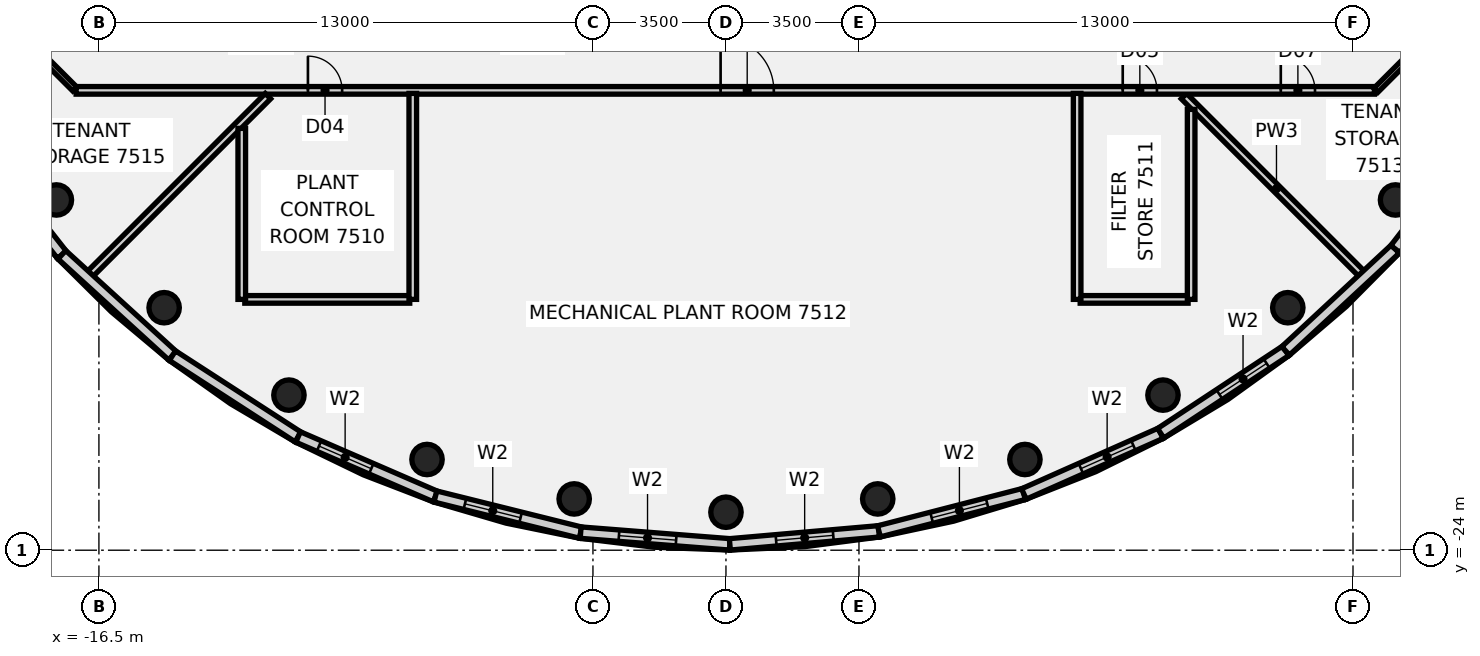
"""IFC4 building model, lengths in metres.
Left out: names, types, materials, properties, quantities, classifications, styles, units other than length and angle.
Written with IfcOpenShell. Run it as: python <this file> out.ifc"""

import sys

from ifc_helpers import new_model, si_unit, direction, frame, frame_2d, origin, origin_2d, place, context, subcontext, project, spatial, rectangle, circle, extrude, element, fill, save


model = new_model("IFC4")
c1 = context("Model", 3, precision=1e-05, world=origin(), true_north=direction((0.0, 1.0)))
c2 = subcontext(c1, "Body", "Model", "MODEL_VIEW")
j1 = project(units=[si_unit("LENGTHUNIT", "METRE"), si_unit("PLANEANGLEUNIT", "RADIAN")], contexts=[c1])
p1 = place(None, origin())
s1 = spatial("IfcSite", under=j1, at=p1, CompositionType="ELEMENT")
p2 = place(p1, origin())
s2 = spatial("IfcBuilding", under=s1, at=p2, CompositionType="ELEMENT")
p3 = place(p2, frame((0.0, 0.0, 305.4)))
s3 = spatial("IfcBuildingStorey", under=s2, at=p3, CompositionType="ELEMENT", Elevation=305.4)
for number, where, z_axis, x_axis in (
    (1, (-17.619, -14.784, -0.18), (0.0, 0.0, 1.0), (1.0, 0.0, 0.0)),
    (2, (-14.784, -17.619, -0.18), (0.0, 0.0, 1.0), (1.0, 0.0, 0.0)),
    (3, (-11.5, -19.919, -0.18), (0.0, 0.0, 1.0), (1.0, 0.0, 0.0)),
    (4, (-7.866, -21.613, -0.18), (0.0, 0.0, 1.0), (1.0, 0.0, 0.0)),
    (5, (-3.994, -22.651, -0.18), (0.0, 0.0, 1.0), (1.0, 0.0, 0.0)),
    (6, (0.0, -23.0, -0.18), (0.0, 0.0, 1.0), (1.0, 0.0, 0.0)),
    (7, (3.994, -22.651, -0.18), (0.0, 0.0, 1.0), (1.0, 0.0, 0.0)),
    (8, (7.866, -21.613, -0.18), (0.0, 0.0, 1.0), (1.0, 0.0, 0.0)),
    (9, (11.5, -19.919, -0.18), (0.0, 0.0, 1.0), (1.0, 0.0, 0.0)),
    (10, (14.784, -17.619, -0.18), (0.0, 0.0, 1.0), (1.0, 0.0, 0.0)),
    (11, (17.619, -14.784, -0.18), (0.0, 0.0, 1.0), (1.0, 0.0, 0.0)),
):
    element("IfcColumn", number, at=place(p3, frame(where, z_axis=z_axis, x_axis=x_axis)), inside=s3, PredefinedType="COLUMN", context=c2, shape_type="SweptSolid", body=[
        extrude(circle(Radius=0.4, at=origin_2d()), origin(), (0.0, 0.0, 1.0), 4.0),
    ])
p4 = place(p3, frame((-18.872, -10.128, 0.0), z_axis=(0.0, 0.0, 1.0), x_axis=(0.707106781187, -0.707106781187, 0.0)))
e12 = element("IfcWall", 12, at=p4, inside=s3, PredefinedType="PARTITIONING", context=c2, shape_type="SweptSolid", body=[
    extrude(rectangle(XDim=2.455, YDim=0.15, at=frame_2d((1.228, 0.0))), origin(), (0.0, 0.0, 1.0), 3.22),
])
p5 = place(p3, frame((12.052, -12.052, 0.0), z_axis=(0.0, 0.0, 1.0), x_axis=(0.707106781187, -0.707106781187, 0.0)))
e13 = element("IfcWall", 13, at=p5, inside=s3, PredefinedType="PARTITIONING", context=c2, shape_type="SweptSolid", body=[
    extrude(rectangle(XDim=6.886, YDim=0.2, at=frame_2d((3.443, 0.0))), origin(), (0.0, 0.0, 1.0), 3.22),
])
p6 = place(p3, frame((-17.1, -11.9, 0.0), z_axis=(0.0, 0.0, 1.0), x_axis=(1.0, 0.0, 0.0)))
e14 = element("IfcWall", 14, at=p6, inside=s3, PredefinedType="PARTITIONING", context=c2, shape_type="SweptSolid", body=[
    extrude(rectangle(XDim=34.165, YDim=0.2, at=frame_2d((17.083, 0.0))), origin(), (0.0, 0.0, 1.0), 3.22),
])
p7 = place(p6, frame((6.1, 0.0, 0.0)))
e15 = element("IfcOpeningElement", 15, at=p7, cuts=e14, PredefinedType="OPENING", context=c2, shape_type="SweptSolid", body=[
    extrude(rectangle(XDim=0.9, YDim=2.1, at=frame_2d((0.45, 1.05))), frame((0.0, 0.11, 0.0), z_axis=(0.0, -1.0, 0.0), x_axis=(1.0, 0.0, 0.0)), (0.0, 0.0, 1.0), 0.22),
])
p8 = place(p6, frame((27.541, 0.0, 0.0)))
e16 = element("IfcOpeningElement", 16, at=p8, cuts=e14, PredefinedType="OPENING", context=c2, shape_type="SweptSolid", body=[
    extrude(rectangle(XDim=0.9, YDim=2.1, at=frame_2d((0.45, 1.05))), frame((0.0, 0.11, 0.0), z_axis=(0.0, -1.0, 0.0), x_axis=(1.0, 0.0, 0.0)), (0.0, 0.0, 1.0), 0.22),
])
p9 = place(p6, frame((16.959, 0.0, 0.0)))
e17 = element("IfcOpeningElement", 17, at=p9, cuts=e14, PredefinedType="OPENING", context=c2, shape_type="SweptSolid", body=[
    extrude(rectangle(XDim=1.4, YDim=2.1, at=frame_2d((0.7, 1.05))), frame((0.0, 0.11, 0.0), z_axis=(0.0, -1.0, 0.0), x_axis=(1.0, 0.0, 0.0)), (0.0, 0.0, 1.0), 0.22),
])
p10 = place(p6, frame((31.7, 0.0, 0.0)))
e18 = element("IfcOpeningElement", 18, at=p10, cuts=e14, PredefinedType="OPENING", context=c2, shape_type="SweptSolid", body=[
    extrude(rectangle(XDim=0.9, YDim=2.1, at=frame_2d((0.45, 1.05))), frame((0.0, 0.11, 0.0), z_axis=(0.0, -1.0, 0.0), x_axis=(1.0, 0.0, 0.0)), (0.0, 0.0, 1.0), 0.22),
])
p11 = place(p3, frame((-12.661, -17.4, 0.0), z_axis=(0.0, 0.0, 1.0), x_axis=(1.0, 0.0, 0.0)))
e19 = element("IfcWall", 19, at=p11, inside=s3, PredefinedType="PARTITIONING", context=c2, shape_type="SweptSolid", body=[
    extrude(rectangle(XDim=4.34, YDim=0.2, at=frame_2d((2.17, 0.0))), origin(), (0.0, 0.0, 1.0), 3.22),
])
p12 = place(p3, frame((9.321, -17.4, 0.0), z_axis=(0.0, 0.0, 1.0), x_axis=(1.0, 0.0, 0.0)))
e20 = element("IfcWall", 20, at=p12, inside=s3, PredefinedType="PARTITIONING", context=c2, shape_type="SweptSolid", body=[
    extrude(rectangle(XDim=2.84, YDim=0.2, at=frame_2d((1.42, 0.0))), origin(), (0.0, 0.0, 1.0), 3.22),
])
p13 = place(p3, frame((-16.927, -16.927, 0.0), z_axis=(0.0, 0.0, 1.0), x_axis=(0.707106781187, 0.707106781187, 0.0)))
e21 = element("IfcWall", 21, at=p13, inside=s3, PredefinedType="PARTITIONING", context=c2, shape_type="SweptSolid", body=[
    extrude(rectangle(XDim=6.894, YDim=0.2, at=frame_2d((3.447, 0.0))), origin(), (0.0, 0.0, 1.0), 3.22),
])
p14 = place(p3, frame((17.1, -11.9, 0.0), z_axis=(0.0, 0.0, 1.0), x_axis=(0.707106781187, 0.707106781187, 0.0)))
e22 = element("IfcWall", 22, at=p14, inside=s3, PredefinedType="PARTITIONING", context=c2, shape_type="SweptSolid", body=[
    extrude(rectangle(XDim=2.505, YDim=0.15, at=frame_2d((1.253, 0.0))), origin(), (0.0, 0.0, 1.0), 3.22),
])
p15 = place(p3, frame((-12.741, -17.4, 0.0), z_axis=(0.0, 0.0, 1.0), x_axis=(0.0, 1.0, 0.0)))
e23 = element("IfcWall", 23, at=p15, inside=s3, PredefinedType="PARTITIONING", context=c2, shape_type="SweptSolid", body=[
    extrude(rectangle(XDim=4.499, YDim=0.2, at=frame_2d((2.25, 0.0))), origin(), (0.0, 0.0, 1.0), 3.22),
])
for number, where, z_axis, x_axis in (
    (24, (-8.241, -17.4, 0.0), (0.0, 0.0, 1.0), (0.0, 1.0, 0.0)),
    (25, (9.241, -17.4, 0.0), (0.0, 0.0, 1.0), (0.0, 1.0, 0.0)),
):
    element("IfcWall", number, at=place(p3, frame(where, z_axis=z_axis, x_axis=x_axis)), inside=s3, PredefinedType="PARTITIONING", context=c2, shape_type="SweptSolid", body=[
        extrude(rectangle(XDim=5.42, YDim=0.2, at=frame_2d((2.71, 0.0))), origin(), (0.0, 0.0, 1.0), 3.22),
    ])
p16 = place(p3, frame((12.241, -17.4, 0.0), z_axis=(0.0, 0.0, 1.0), x_axis=(0.0, 1.0, 0.0)))
e26 = element("IfcWall", 26, at=p16, inside=s3, PredefinedType="PARTITIONING", context=c2, shape_type="SweptSolid", body=[
    extrude(rectangle(XDim=4.999, YDim=0.2, at=frame_2d((2.5, 0.0))), origin(), (0.0, 0.0, 1.0), 3.22),
])
p17 = place(p3, frame((-19.906, -13.128, 0.0), z_axis=(0.0, 0.0, 1.0), x_axis=(0.617577851206, -0.786509756901, 0.0)))
e27 = element("IfcWall", 27, at=p17, inside=s3, PredefinedType="SOLIDWALL", context=c2, shape_type="SweptSolid", body=[
    extrude(rectangle(XDim=3.938, YDim=0.3, at=frame_2d((1.969, 0.0))), origin(), (0.0, 0.0, 1.0), 3.82),
])
p18 = place(p3, frame((-17.474, -16.226, 0.0), z_axis=(0.0, 0.0, 1.0), x_axis=(0.738634435884, -0.674106200926, 0.0)))
e28 = element("IfcWall", 28, at=p18, inside=s3, PredefinedType="SOLIDWALL", context=c2, shape_type="SweptSolid", body=[
    extrude(rectangle(XDim=3.938, YDim=0.3, at=frame_2d((1.969, 0.0))), origin(), (0.0, 0.0, 1.0), 3.82),
])
p19 = place(p3, frame((-14.565, -18.881, 0.0), z_axis=(0.0, 0.0, 1.0), x_axis=(0.839498632024, -0.54336180104, 0.0)))
e29 = element("IfcWall", 29, at=p19, inside=s3, PredefinedType="SOLIDWALL", context=c2, shape_type="SweptSolid", body=[
    extrude(rectangle(XDim=3.938, YDim=0.3, at=frame_2d((1.969, 0.0))), origin(), (0.0, 0.0, 1.0), 3.82),
])
p20 = place(p3, frame((-11.259, -21.021, 0.0), z_axis=(0.0, 0.0, 1.0), x_axis=(0.917505110173, -0.397723990735, 0.0)))
e30 = element("IfcWall", 30, at=p20, inside=s3, PredefinedType="SOLIDWALL", context=c2, shape_type="SweptSolid", body=[
    extrude(rectangle(XDim=3.938, YDim=0.3, at=frame_2d((1.969, 0.0))), origin(), (0.0, 0.0, 1.0), 3.82),
])
p21 = place(p20, frame((0.6, 0.0, 1.4)))
e31 = element("IfcOpeningElement", 31, at=p21, cuts=e30, PredefinedType="OPENING", context=c2, shape_type="SweptSolid", body=[
    extrude(rectangle(XDim=1.498, YDim=2.12, at=frame_2d((0.749, 1.06))), frame((0.0, 0.16, 0.0), z_axis=(0.0, -1.0, 0.0), x_axis=(1.0, 0.0, 0.0)), (0.0, 0.0, 1.0), 0.32),
])
p22 = place(p3, frame((-7.646, -22.587, 0.0), z_axis=(0.0, 0.0, 1.0), x_axis=(0.970440788586, -0.241339337547, 0.0)))
e32 = element("IfcWall", 32, at=p22, inside=s3, PredefinedType="SOLIDWALL", context=c2, shape_type="SweptSolid", body=[
    extrude(rectangle(XDim=3.938, YDim=0.3, at=frame_2d((1.969, 0.0))), origin(), (0.0, 0.0, 1.0), 3.82),
])
p23 = place(p22, frame((0.801, 0.0, 1.4)))
e33 = element("IfcOpeningElement", 33, at=p23, cuts=e32, PredefinedType="OPENING", context=c2, shape_type="SweptSolid", body=[
    extrude(rectangle(XDim=1.509, YDim=2.12, at=frame_2d((0.754, 1.06))), frame((0.0, 0.16, 0.0), z_axis=(0.0, -1.0, 0.0), x_axis=(1.0, 0.0, 0.0)), (0.0, 0.0, 1.0), 0.32),
])
p24 = place(p3, frame((-3.824, -23.537, 0.0), z_axis=(0.0, 0.0, 1.0), x_axis=(0.996930318741, -0.078293930641, 0.0)))
e34 = element("IfcWall", 34, at=p24, inside=s3, PredefinedType="SOLIDWALL", context=c2, shape_type="SweptSolid", body=[
    extrude(rectangle(XDim=3.938, YDim=0.3, at=frame_2d((1.969, 0.0))), origin(), (0.0, 0.0, 1.0), 3.82),
])
p25 = place(p24, frame((1.011, 0.0, 1.4)))
e35 = element("IfcOpeningElement", 35, at=p25, cuts=e34, PredefinedType="OPENING", context=c2, shape_type="SweptSolid", body=[
    extrude(rectangle(XDim=1.509, YDim=2.12, at=frame_2d((0.754, 1.06))), frame((0.0, 0.16, 0.0), z_axis=(0.0, -1.0, 0.0), x_axis=(1.0, 0.0, 0.0)), (0.0, 0.0, 1.0), 0.32),
])
p26 = place(p3, frame((0.103, -23.846, 0.0), z_axis=(0.0, 0.0, 1.0), x_axis=(0.99621635874, 0.08690780505, 0.0)))
e36 = element("IfcWall", 36, at=p26, inside=s3, PredefinedType="SOLIDWALL", context=c2, shape_type="SweptSolid", body=[
    extrude(rectangle(XDim=3.938, YDim=0.3, at=frame_2d((1.969, 0.0))), origin(), (0.0, 0.0, 1.0), 3.82),
])
p27 = place(p26, frame((1.221, 0.0, 1.4)))
e37 = element("IfcOpeningElement", 37, at=p27, cuts=e36, PredefinedType="OPENING", context=c2, shape_type="SweptSolid", body=[
    extrude(rectangle(XDim=1.509, YDim=2.12, at=frame_2d((0.755, 1.06))), frame((0.0, 0.16, 0.0), z_axis=(0.0, -1.0, 0.0), x_axis=(1.0, 0.0, 0.0)), (0.0, 0.0, 1.0), 0.32),
])
p28 = place(p3, frame((4.026, -23.503, 0.0), z_axis=(0.0, 0.0, 1.0), x_axis=(0.968336809904, 0.24964739651, 0.0)))
e38 = element("IfcWall", 38, at=p28, inside=s3, PredefinedType="SOLIDWALL", context=c2, shape_type="SweptSolid", body=[
    extrude(rectangle(XDim=3.938, YDim=0.3, at=frame_2d((1.969, 0.0))), origin(), (0.0, 0.0, 1.0), 3.82),
])
p29 = place(p28, frame((1.432, 0.0, 1.4)))
e39 = element("IfcOpeningElement", 39, at=p29, cuts=e38, PredefinedType="OPENING", context=c2, shape_type="SweptSolid", body=[
    extrude(rectangle(XDim=1.509, YDim=2.12, at=frame_2d((0.754, 1.06))), frame((0.0, 0.16, 0.0), z_axis=(0.0, -1.0, 0.0), x_axis=(1.0, 0.0, 0.0)), (0.0, 0.0, 1.0), 0.32),
])
p30 = place(p3, frame((7.84, -22.52, 0.0), z_axis=(0.0, 0.0, 1.0), x_axis=(0.91404912862, 0.405603489221, 0.0)))
e40 = element("IfcWall", 40, at=p30, inside=s3, PredefinedType="SOLIDWALL", context=c2, shape_type="SweptSolid", body=[
    extrude(rectangle(XDim=3.938, YDim=0.3, at=frame_2d((1.969, 0.0))), origin(), (0.0, 0.0, 1.0), 3.82),
])
p31 = place(p30, frame((1.643, 0.0, 1.4)))
e41 = element("IfcOpeningElement", 41, at=p31, cuts=e40, PredefinedType="OPENING", context=c2, shape_type="SweptSolid", body=[
    extrude(rectangle(XDim=1.509, YDim=2.12, at=frame_2d((0.754, 1.06))), frame((0.0, 0.16, 0.0), z_axis=(0.0, -1.0, 0.0), x_axis=(1.0, 0.0, 0.0)), (0.0, 0.0, 1.0), 0.32),
])
p32 = place(p3, frame((11.439, -20.923, 0.0), z_axis=(0.0, 0.0, 1.0), x_axis=(0.834786621205, 0.550573607302, 0.0)))
e42 = element("IfcWall", 42, at=p32, inside=s3, PredefinedType="SOLIDWALL", context=c2, shape_type="SweptSolid", body=[
    extrude(rectangle(XDim=3.938, YDim=0.3, at=frame_2d((1.969, 0.0))), origin(), (0.0, 0.0, 1.0), 3.82),
])
p33 = place(p32, frame((1.853, 0.0, 1.4)))
e43 = element("IfcOpeningElement", 43, at=p33, cuts=e42, PredefinedType="OPENING", context=c2, shape_type="SweptSolid", body=[
    extrude(rectangle(XDim=1.485, YDim=2.12, at=frame_2d((0.743, 1.06))), frame((0.0, 0.16, 0.0), z_axis=(0.0, -1.0, 0.0), x_axis=(1.0, 0.0, 0.0)), (0.0, 0.0, 1.0), 0.32),
])
p34 = place(p3, frame((14.727, -18.754, 0.0), z_axis=(0.0, 0.0, 1.0), x_axis=(0.732813362883, 0.680429698926, 0.0)))
e44 = element("IfcWall", 44, at=p34, inside=s3, PredefinedType="SOLIDWALL", context=c2, shape_type="SweptSolid", body=[
    extrude(rectangle(XDim=3.938, YDim=0.3, at=frame_2d((1.969, 0.0))), origin(), (0.0, 0.0, 1.0), 3.82),
])
p35 = place(p3, frame((17.613, -16.075, 0.0), z_axis=(0.0, 0.0, 1.0), x_axis=(0.610785688376, 0.79179596038, 0.0)))
e45 = element("IfcWall", 45, at=p35, inside=s3, PredefinedType="SOLIDWALL", context=c2, shape_type="SweptSolid", body=[
    extrude(rectangle(XDim=3.938, YDim=0.3, at=frame_2d((1.969, 0.0))), origin(), (0.0, 0.0, 1.0), 3.82),
])
p36 = place(p7, frame((0.9, 0.0, 0.0), z_axis=(0.0, 0.0, 1.0), x_axis=(-1.0, 0.0, 0.0)))
e46 = element("IfcDoor", 46, at=p36, inside=s3, OperationType="SINGLE_SWING_LEFT", PredefinedType="DOOR", context=c2, shape_type="SweptSolid", body=[
    extrude(rectangle(XDim=0.9, YDim=2.1, at=frame_2d((0.45, 1.05))), frame((0.0, 0.025, 0.0), z_axis=(0.0, -1.0, 0.0), x_axis=(1.0, 0.0, 0.0)), (0.0, 0.0, 1.0), 0.05),
])
fill(e15, e46)
p37 = place(p8, frame((0.9, 0.0, 0.0), z_axis=(0.0, 0.0, 1.0), x_axis=(-1.0, 0.0, 0.0)))
e47 = element("IfcDoor", 47, at=p37, inside=s3, OperationType="SINGLE_SWING_RIGHT", PredefinedType="DOOR", context=c2, shape_type="SweptSolid", body=[
    extrude(rectangle(XDim=0.9, YDim=2.1, at=frame_2d((0.45, 1.05))), frame((0.0, 0.025, 0.0), z_axis=(0.0, -1.0, 0.0), x_axis=(1.0, 0.0, 0.0)), (0.0, 0.0, 1.0), 0.05),
])
fill(e16, e47)
p38 = place(p9, frame((1.4, 0.0, 0.0), z_axis=(0.0, 0.0, 1.0), x_axis=(-1.0, 0.0, 0.0)))
e48 = element("IfcDoor", 48, at=p38, inside=s3, OperationType="DOUBLE_DOOR_SINGLE_SWING", PredefinedType="DOOR", context=c2, shape_type="SweptSolid", body=[
    extrude(rectangle(XDim=1.4, YDim=2.1, at=frame_2d((0.7, 1.05))), frame((0.0, 0.025, 0.0), z_axis=(0.0, -1.0, 0.0), x_axis=(1.0, 0.0, 0.0)), (0.0, 0.0, 1.0), 0.05),
])
fill(e17, e48)
p39 = place(p10, frame((0.9, 0.0, 0.0), z_axis=(0.0, 0.0, 1.0), x_axis=(-1.0, 0.0, 0.0)))
e49 = element("IfcDoor", 49, at=p39, inside=s3, OperationType="SINGLE_SWING_RIGHT", PredefinedType="DOOR", context=c2, shape_type="SweptSolid", body=[
    extrude(rectangle(XDim=0.9, YDim=2.1, at=frame_2d((0.45, 1.05))), frame((0.0, 0.025, 0.0), z_axis=(0.0, -1.0, 0.0), x_axis=(1.0, 0.0, 0.0)), (0.0, 0.0, 1.0), 0.05),
])
fill(e18, e49)
p40 = place(p21, origin())
e50 = element("IfcWindow", 50, at=p40, inside=s3, PartitioningType="SINGLE_PANEL", PredefinedType="WINDOW", context=c2, shape_type="SweptSolid", body=[
    extrude(rectangle(XDim=1.498, YDim=2.12, at=frame_2d((0.749, 1.06))), frame((0.0, 0.03, 0.0), z_axis=(0.0, -1.0, 0.0), x_axis=(1.0, 0.0, 0.0)), (0.0, 0.0, 1.0), 0.06),
])
fill(e31, e50)
p41 = place(p23, origin())
e51 = element("IfcWindow", 51, at=p41, inside=s3, PartitioningType="SINGLE_PANEL", PredefinedType="WINDOW", context=c2, shape_type="SweptSolid", body=[
    extrude(rectangle(XDim=1.509, YDim=2.12, at=frame_2d((0.754, 1.06))), frame((0.0, 0.03, 0.0), z_axis=(0.0, -1.0, 0.0), x_axis=(1.0, 0.0, 0.0)), (0.0, 0.0, 1.0), 0.06),
])
fill(e33, e51)
p42 = place(p25, origin())
e52 = element("IfcWindow", 52, at=p42, inside=s3, PartitioningType="SINGLE_PANEL", PredefinedType="WINDOW", context=c2, shape_type="SweptSolid", body=[
    extrude(rectangle(XDim=1.509, YDim=2.12, at=frame_2d((0.754, 1.06))), frame((0.0, 0.03, 0.0), z_axis=(0.0, -1.0, 0.0), x_axis=(1.0, 0.0, 0.0)), (0.0, 0.0, 1.0), 0.06),
])
fill(e35, e52)
p43 = place(p27, origin())
e53 = element("IfcWindow", 53, at=p43, inside=s3, PartitioningType="SINGLE_PANEL", PredefinedType="WINDOW", context=c2, shape_type="SweptSolid", body=[
    extrude(rectangle(XDim=1.509, YDim=2.12, at=frame_2d((0.755, 1.06))), frame((0.0, 0.03, 0.0), z_axis=(0.0, -1.0, 0.0), x_axis=(1.0, 0.0, 0.0)), (0.0, 0.0, 1.0), 0.06),
])
fill(e37, e53)
p44 = place(p29, origin())
e54 = element("IfcWindow", 54, at=p44, inside=s3, PartitioningType="SINGLE_PANEL", PredefinedType="WINDOW", context=c2, shape_type="SweptSolid", body=[
    extrude(rectangle(XDim=1.509, YDim=2.12, at=frame_2d((0.754, 1.06))), frame((0.0, 0.03, 0.0), z_axis=(0.0, -1.0, 0.0), x_axis=(1.0, 0.0, 0.0)), (0.0, 0.0, 1.0), 0.06),
])
fill(e39, e54)
p45 = place(p31, origin())
e55 = element("IfcWindow", 55, at=p45, inside=s3, PartitioningType="SINGLE_PANEL", PredefinedType="WINDOW", context=c2, shape_type="SweptSolid", body=[
    extrude(rectangle(XDim=1.509, YDim=2.12, at=frame_2d((0.754, 1.06))), frame((0.0, 0.03, 0.0), z_axis=(0.0, -1.0, 0.0), x_axis=(1.0, 0.0, 0.0)), (0.0, 0.0, 1.0), 0.06),
])
fill(e41, e55)
p46 = place(p33, origin())
e56 = element("IfcWindow", 56, at=p46, inside=s3, PartitioningType="SINGLE_PANEL", PredefinedType="WINDOW", context=c2, shape_type="SweptSolid", body=[
    extrude(rectangle(XDim=1.485, YDim=2.12, at=frame_2d((0.743, 1.06))), frame((0.0, 0.03, 0.0), z_axis=(0.0, -1.0, 0.0), x_axis=(1.0, 0.0, 0.0)), (0.0, 0.0, 1.0), 0.06),
])
fill(e43, e56)
save(model, sys.argv[1])
